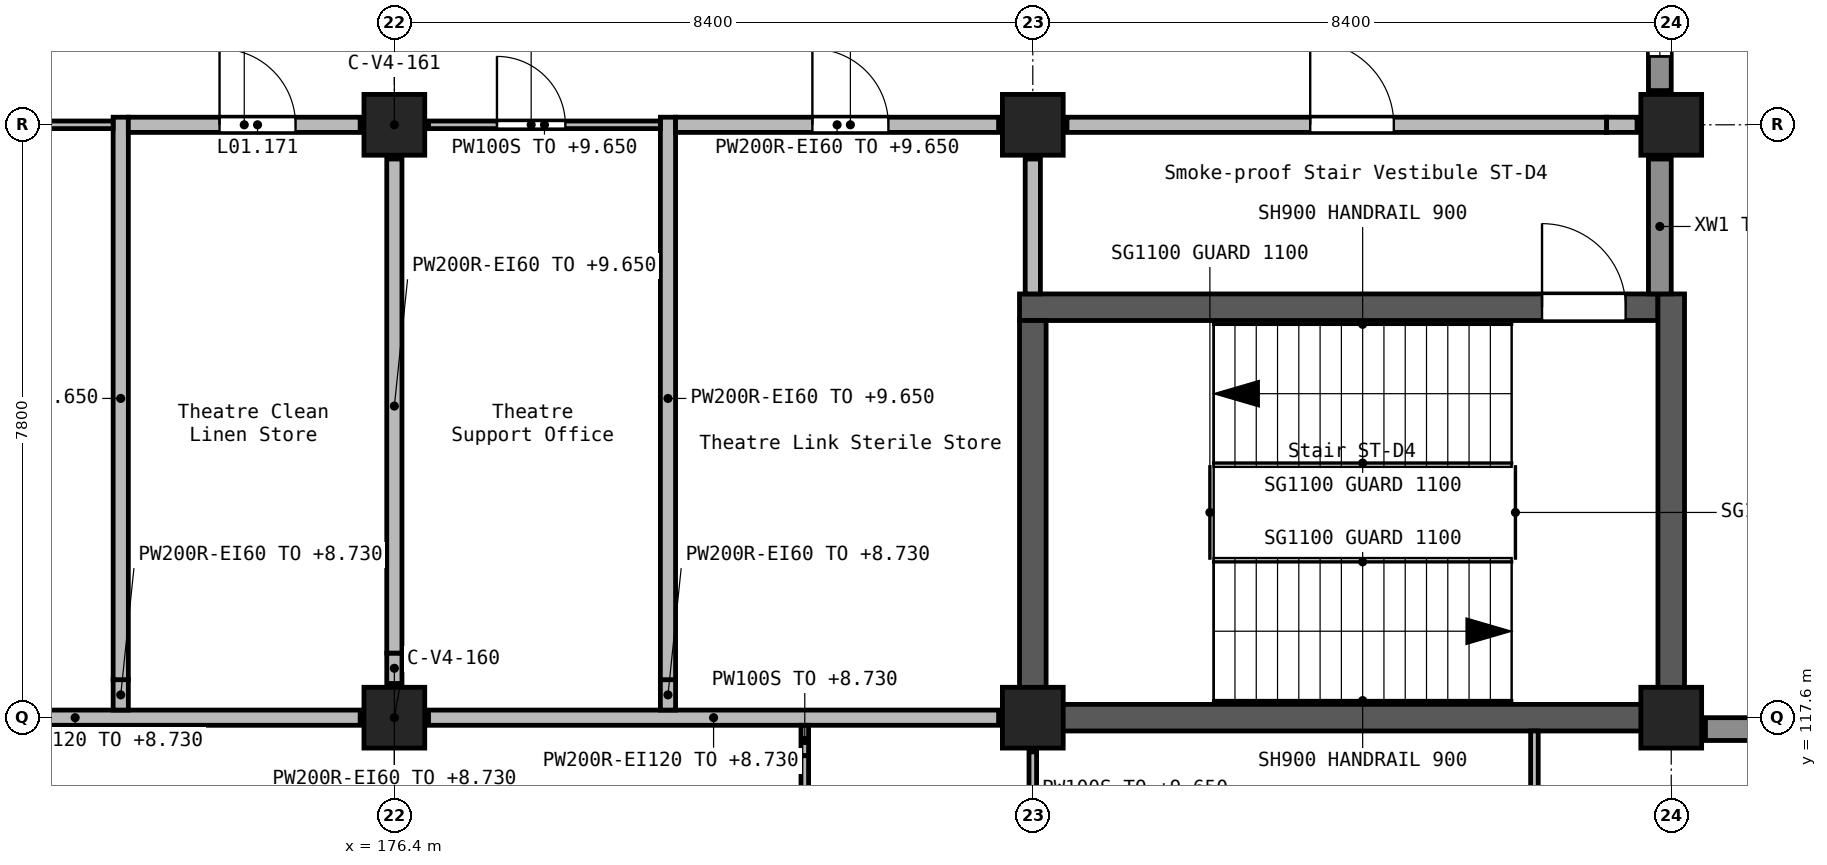
"""IFC4 building model, lengths in metres.
Left out: names, types, materials, properties, quantities, classifications, styles, units other than length and angle.
Written with IfcOpenShell. Run it as: python <this file> out.ifc"""

import sys

from ifc_helpers import new_model, si_unit, direction, frame, frame_2d, origin, origin_2d, place, context, subcontext, project, spatial, rectangle, extrude, element, fill, save


model = new_model("IFC4")
c1 = context("Model", 3, precision=1e-05, world=origin(), true_north=direction((0.0, 1.0)))
c2 = subcontext(c1, "Body", "Model", "MODEL_VIEW")
j1 = project(units=[si_unit("LENGTHUNIT", "METRE"), si_unit("PLANEANGLEUNIT", "RADIAN")], contexts=[c1])
p1 = place(None, origin())
s1 = spatial("IfcSite", under=j1, at=p1, CompositionType="ELEMENT")
p2 = place(p1, origin())
s2 = spatial("IfcBuilding", under=s1, at=p2, CompositionType="ELEMENT")
p3 = place(p2, frame((0.0, 0.0, 5.4)))
s3 = spatial("IfcBuildingStorey", under=s2, at=p3, CompositionType="ELEMENT", Elevation=5.4)
for number, where, z_axis, x_axis in (
    (1, (176.4, 117.6, 0.0), (0.0, 0.0, 1.0), (1.0, 0.0, 0.0)),
    (2, (176.4, 125.4, 0.0), (0.0, 0.0, 1.0), (1.0, 0.0, 0.0)),
    (3, (184.8, 117.6, 0.0), (0.0, 0.0, 1.0), (1.0, 0.0, 0.0)),
    (4, (184.8, 125.4, 0.0), (0.0, 0.0, 1.0), (1.0, 0.0, 0.0)),
    (5, (193.2, 117.6, 0.0), (0.0, 0.0, 1.0), (1.0, 0.0, 0.0)),
    (6, (193.2, 125.4, 0.0), (0.0, 0.0, 1.0), (1.0, 0.0, 0.0)),
):
    element("IfcColumn", number, at=place(p3, frame(where, z_axis=z_axis, x_axis=x_axis)), inside=s3, PredefinedType="COLUMN", context=c2, shape_type="SweptSolid", body=[
        extrude(rectangle(XDim=0.8, YDim=0.8, at=origin_2d()), origin(), (0.0, 0.0, 1.0), 4.5),
    ])
p4 = place(p3, frame((184.625, 123.0, 0.0), z_axis=(0.0, 0.0, 1.0), x_axis=(1.0, 0.0, 0.0)))
e7 = element("IfcWall", 7, at=p4, inside=s3, PredefinedType="SHEAR", context=c2, shape_type="SweptSolid", body=[
    extrude(rectangle(XDim=8.4, YDim=0.35, at=frame_2d((4.2, 0.0))), origin(), (0.0, 0.0, 1.0), 4.5),
])
p5 = place(p4, frame((6.875, 0.0, 0.0)))
e8 = element("IfcOpeningElement", 8, at=p5, cuts=e7, PredefinedType="OPENING", context=c2, shape_type="SweptSolid", body=[
    extrude(rectangle(XDim=1.1, YDim=2.1, at=frame_2d((0.55, 1.05))), frame((0.0, 0.185, 0.0), z_axis=(0.0, -1.0, 0.0), x_axis=(1.0, 0.0, 0.0)), (0.0, 0.0, 1.0), 0.37),
])
p6 = place(p3, frame((184.8, 117.425, 0.0), z_axis=(0.0, 0.0, 1.0), x_axis=(0.0, 1.0, 0.0)))
e9 = element("IfcWall", 9, at=p6, inside=s3, PredefinedType="SHEAR", context=c2, shape_type="SweptSolid", body=[
    extrude(rectangle(XDim=5.4, YDim=0.35, at=frame_2d((2.7, 0.0))), origin(), (0.0, 0.0, 1.0), 4.5),
])
p7 = place(p3, frame((184.975, 117.6, 0.0), z_axis=(0.0, 0.0, 1.0), x_axis=(1.0, 0.0, 0.0)))
e10 = element("IfcWall", 10, at=p7, inside=s3, PredefinedType="SHEAR", context=c2, shape_type="SweptSolid", body=[
    extrude(rectangle(XDim=8.05, YDim=0.35, at=frame_2d((4.025, 0.0))), origin(), (0.0, 0.0, 1.0), 4.5),
])
p8 = place(p3, frame((193.2, 117.425, 0.0), z_axis=(0.0, 0.0, 1.0), x_axis=(0.0, 1.0, 0.0)))
e11 = element("IfcWall", 11, at=p8, inside=s3, PredefinedType="SHEAR", context=c2, shape_type="SweptSolid", body=[
    extrude(rectangle(XDim=5.75, YDim=0.35, at=frame_2d((2.875, 0.0))), origin(), (0.0, 0.0, 1.0), 4.5),
])
p9 = place(p3, frame((197.0, 117.45, 0.0), z_axis=(0.0, 0.0, 1.0), x_axis=(-1.0, 0.0, 0.0)))
e12 = element("IfcWall", 12, at=p9, inside=s3, PredefinedType="STANDARD", context=c2, shape_type="SweptSolid", body=[
    extrude(rectangle(XDim=3.35, YDim=0.3, at=frame_2d((1.675, 0.0))), origin(), (0.0, 0.0, 1.0), 3.35),
])
p10 = place(p9, frame((1.075, 0.0, 1.2)))
e13 = element("IfcOpeningElement", 13, at=p10, cuts=e12, PredefinedType="OPENING", context=c2, shape_type="SweptSolid", body=[
    extrude(rectangle(XDim=1.2, YDim=1.2, at=frame_2d((0.6, 0.6))), frame((0.0, 0.16, 0.0), z_axis=(0.0, -1.0, 0.0), x_axis=(1.0, 0.0, 0.0)), (0.0, 0.0, 1.0), 0.32),
])
p11 = place(p3, frame((193.05, 123.175, 0.0), z_axis=(0.0, 0.0, 1.0), x_axis=(0.0, 1.0, 0.0)))
e14 = element("IfcWall", 14, at=p11, inside=s3, PredefinedType="STANDARD", context=c2, shape_type="SweptSolid", body=[
    extrude(rectangle(XDim=1.775, YDim=0.3, at=frame_2d((0.887, 0.0))), origin(), (0.0, 0.0, 1.0), 3.35),
])
p12 = place(p3, frame((193.05, 125.85, 0.0), z_axis=(0.0, 0.0, 1.0), x_axis=(0.0, 1.0, 0.0)))
e15 = element("IfcWall", 15, at=p12, inside=s3, PredefinedType="STANDARD", context=c2, shape_type="SweptSolid", body=[
    extrude(rectangle(XDim=2.7, YDim=0.3, at=frame_2d((1.35, 0.0))), origin(), (0.0, 0.0, 1.0), 3.35),
])
p13 = place(p12, frame((0.45, 0.0, 0.9)))
e16 = element("IfcOpeningElement", 16, at=p13, cuts=e15, PredefinedType="OPENING", context=c2, shape_type="SweptSolid", body=[
    extrude(rectangle(XDim=1.8, YDim=1.5, at=frame_2d((0.9, 0.75))), frame((0.0, 0.16, 0.0), z_axis=(0.0, -1.0, 0.0), x_axis=(1.0, 0.0, 0.0)), (0.0, 0.0, 1.0), 0.32),
])
for number, where, z_axis, x_axis in (
    (17, (184.35, 117.6, 0.0), (0.0, 0.0, 1.0), (-1.0, 0.0, 0.0)),
    (18, (175.95, 117.6, 0.0), (0.0, 0.0, 1.0), (-1.0, 0.0, 0.0)),
):
    element("IfcWall", number, at=place(p3, frame(where, z_axis=z_axis, x_axis=x_axis)), inside=s3, PredefinedType="SOLIDWALL", context=c2, shape_type="SweptSolid", body=[
        extrude(rectangle(XDim=7.5, YDim=0.2, at=frame_2d((3.75, 0.0))), origin(), (0.0, 0.0, 1.0), 3.33),
    ])
p14 = place(p3, frame((185.25, 125.4, 0.0), z_axis=(0.0, 0.0, 1.0), x_axis=(1.0, 0.0, 0.0)))
e19 = element("IfcWall", 19, at=p14, inside=s3, PredefinedType="SOLIDWALL", context=c2, shape_type="SweptSolid", body=[
    extrude(rectangle(XDim=7.1, YDim=0.2, at=frame_2d((3.55, 0.0))), origin(), (0.0, 0.0, 1.0), 4.25),
])
p15 = place(p14, frame((3.2, 0.0, 0.0)))
e20 = element("IfcOpeningElement", 20, at=p15, cuts=e19, PredefinedType="OPENING", context=c2, shape_type="SweptSolid", body=[
    extrude(rectangle(XDim=1.1, YDim=2.1, at=frame_2d((0.55, 1.05))), frame((0.0, 0.11, 0.0), z_axis=(0.0, -1.0, 0.0), x_axis=(1.0, 0.0, 0.0)), (0.0, 0.0, 1.0), 0.22),
])
p16 = place(p3, frame((192.35, 125.4, 0.0), z_axis=(0.0, 0.0, 1.0), x_axis=(1.0, 0.0, 0.0)))
e21 = element("IfcWall", 21, at=p16, inside=s3, PredefinedType="SOLIDWALL", context=c2, shape_type="SweptSolid", body=[
    extrude(rectangle(XDim=0.4, YDim=0.2, at=frame_2d((0.2, 0.0))), origin(), (0.0, 0.0, 1.0), 3.33),
])
p17 = place(p3, frame((172.8, 117.7, 0.0), z_axis=(0.0, 0.0, 1.0), x_axis=(0.0, 1.0, 0.0)))
e22 = element("IfcWall", 22, at=p17, inside=s3, PredefinedType="SOLIDWALL", context=c2, shape_type="SweptSolid", body=[
    extrude(rectangle(XDim=0.4, YDim=0.2, at=frame_2d((0.2, 0.0))), origin(), (0.0, 0.0, 1.0), 3.33),
])
p18 = place(p3, frame((172.8, 118.1, 0.0), z_axis=(0.0, 0.0, 1.0), x_axis=(0.0, 1.0, 0.0)))
e23 = element("IfcWall", 23, at=p18, inside=s3, PredefinedType="SOLIDWALL", context=c2, shape_type="SweptSolid", body=[
    extrude(rectangle(XDim=7.4, YDim=0.2, at=frame_2d((3.7, 0.0))), origin(), (0.0, 0.0, 1.0), 4.25),
])
p19 = place(p3, frame((176.4, 118.05, 0.0), z_axis=(0.0, 0.0, 1.0), x_axis=(0.0, 1.0, 0.0)))
e24 = element("IfcWall", 24, at=p19, inside=s3, PredefinedType="SOLIDWALL", context=c2, shape_type="SweptSolid", body=[
    extrude(rectangle(XDim=0.4, YDim=0.2, at=frame_2d((0.2, 0.0))), origin(), (0.0, 0.0, 1.0), 3.33),
])
p20 = place(p3, frame((176.4, 118.45, 0.0), z_axis=(0.0, 0.0, 1.0), x_axis=(0.0, 1.0, 0.0)))
e25 = element("IfcWall", 25, at=p20, inside=s3, PredefinedType="SOLIDWALL", context=c2, shape_type="SweptSolid", body=[
    extrude(rectangle(XDim=6.5, YDim=0.2, at=frame_2d((3.25, 0.0))), origin(), (0.0, 0.0, 1.0), 4.25),
])
p21 = place(p3, frame((180.0, 117.7, 0.0), z_axis=(0.0, 0.0, 1.0), x_axis=(0.0, 1.0, 0.0)))
e26 = element("IfcWall", 26, at=p21, inside=s3, PredefinedType="SOLIDWALL", context=c2, shape_type="SweptSolid", body=[
    extrude(rectangle(XDim=0.4, YDim=0.2, at=frame_2d((0.2, 0.0))), origin(), (0.0, 0.0, 1.0), 3.33),
])
p22 = place(p3, frame((180.0, 118.1, 0.0), z_axis=(0.0, 0.0, 1.0), x_axis=(0.0, 1.0, 0.0)))
e27 = element("IfcWall", 27, at=p22, inside=s3, PredefinedType="SOLIDWALL", context=c2, shape_type="SweptSolid", body=[
    extrude(rectangle(XDim=7.4, YDim=0.2, at=frame_2d((3.7, 0.0))), origin(), (0.0, 0.0, 1.0), 4.25),
])
p23 = place(p3, frame((180.1, 125.4, 0.0), z_axis=(0.0, 0.0, 1.0), x_axis=(1.0, 0.0, 0.0)))
e28 = element("IfcWall", 28, at=p23, inside=s3, PredefinedType="SOLIDWALL", context=c2, shape_type="SweptSolid", body=[
    extrude(rectangle(XDim=4.25, YDim=0.2, at=frame_2d((2.125, 0.0))), origin(), (0.0, 0.0, 1.0), 4.25),
])
p24 = place(p23, frame((1.8, 0.0, 0.0)))
e29 = element("IfcOpeningElement", 29, at=p24, cuts=e28, PredefinedType="OPENING", context=c2, shape_type="SweptSolid", body=[
    extrude(rectangle(XDim=1.0, YDim=2.1, at=frame_2d((0.5, 1.05))), frame((0.0, 0.11, 0.0), z_axis=(0.0, -1.0, 0.0), x_axis=(1.0, 0.0, 0.0)), (0.0, 0.0, 1.0), 0.22),
])
p25 = place(p3, frame((172.9, 125.4, 0.0), z_axis=(0.0, 0.0, 1.0), x_axis=(1.0, 0.0, 0.0)))
e30 = element("IfcWall", 30, at=p25, inside=s3, PredefinedType="SOLIDWALL", context=c2, shape_type="SweptSolid", body=[
    extrude(rectangle(XDim=3.05, YDim=0.2, at=frame_2d((1.525, 0.0))), origin(), (0.0, 0.0, 1.0), 4.25),
])
p26 = place(p25, frame((1.2, 0.0, 0.0)))
e31 = element("IfcOpeningElement", 31, at=p26, cuts=e30, PredefinedType="OPENING", context=c2, shape_type="SweptSolid", body=[
    extrude(rectangle(XDim=1.0, YDim=2.1, at=frame_2d((0.5, 1.05))), frame((0.0, 0.11, 0.0), z_axis=(0.0, -1.0, 0.0), x_axis=(1.0, 0.0, 0.0)), (0.0, 0.0, 1.0), 0.22),
])
p27 = place(p3, frame((184.8, 123.175, 0.0), z_axis=(0.0, 0.0, 1.0), x_axis=(0.0, 1.0, 0.0)))
e32 = element("IfcWall", 32, at=p27, inside=s3, PredefinedType="SOLIDWALL", context=c2, shape_type="SweptSolid", body=[
    extrude(rectangle(XDim=1.775, YDim=0.2, at=frame_2d((0.887, 0.0))), origin(), (0.0, 0.0, 1.0), 4.25),
])
p28 = place(p3, frame((181.8, 117.5, 0.0), z_axis=(0.0, 0.0, 1.0), x_axis=(0.0, -1.0, 0.0)))
e33 = element("IfcWall", 33, at=p28, inside=s3, PredefinedType="PARTITIONING", context=c2, shape_type="SweptSolid", body=[
    extrude(rectangle(XDim=0.4, YDim=0.1, at=frame_2d((0.2, 0.0))), origin(), (0.0, 0.0, 1.0), 3.33),
])
p29 = place(p3, frame((181.8, 117.1, 0.0), z_axis=(0.0, 0.0, 1.0), x_axis=(0.0, -1.0, 0.0)))
e34 = element("IfcWall", 34, at=p29, inside=s3, PredefinedType="PARTITIONING", context=c2, shape_type="SweptSolid", body=[
    extrude(rectangle(XDim=18.15, YDim=0.1, at=frame_2d((9.075, 0.0))), origin(), (0.0, 0.0, 1.0), 4.25),
])
p30 = place(p29, frame((8.401, 0.0, 0.0)))
e35 = element("IfcOpeningElement", 35, at=p30, cuts=e34, PredefinedType="OPENING", context=c2, shape_type="SweptSolid", body=[
    extrude(rectangle(XDim=1.4, YDim=2.1, at=frame_2d((0.7, 1.05))), frame((0.0, 0.06, 0.0), z_axis=(0.0, -1.0, 0.0), x_axis=(1.0, 0.0, 0.0)), (0.0, 0.0, 1.0), 0.12),
])
p31 = place(p29, frame((5.652, 0.0, 0.0)))
e36 = element("IfcOpeningElement", 36, at=p31, cuts=e34, PredefinedType="OPENING", context=c2, shape_type="SweptSolid", body=[
    extrude(rectangle(XDim=0.9, YDim=2.1, at=frame_2d((0.45, 1.05))), frame((0.0, 0.06, 0.0), z_axis=(0.0, -1.0, 0.0), x_axis=(1.0, 0.0, 0.0)), (0.0, 0.0, 1.0), 0.12),
])
p32 = place(p29, frame((1.201, 0.0, 0.0)))
e37 = element("IfcOpeningElement", 37, at=p32, cuts=e34, PredefinedType="OPENING", context=c2, shape_type="SweptSolid", body=[
    extrude(rectangle(XDim=1.4, YDim=2.1, at=frame_2d((0.7, 1.05))), frame((0.0, 0.06, 0.0), z_axis=(0.0, -1.0, 0.0), x_axis=(1.0, 0.0, 0.0)), (0.0, 0.0, 1.0), 0.12),
])
p33 = place(p3, frame((184.8, 117.15, 0.0), z_axis=(0.0, 0.0, 1.0), x_axis=(0.0, -1.0, 0.0)))
e38 = element("IfcWall", 38, at=p33, inside=s3, PredefinedType="PARTITIONING", context=c2, shape_type="SweptSolid", body=[
    extrude(rectangle(XDim=16.25, YDim=0.1, at=frame_2d((8.125, 0.0))), origin(), (0.0, 0.0, 1.0), 4.25),
])
p34 = place(p33, frame((13.55, 0.0, 0.0)))
e39 = element("IfcOpeningElement", 39, at=p34, cuts=e38, PredefinedType="OPENING", context=c2, shape_type="SweptSolid", body=[
    extrude(rectangle(XDim=1.4, YDim=2.1, at=frame_2d((0.7, 1.05))), frame((0.0, 0.06, 0.0), z_axis=(0.0, -1.0, 0.0), x_axis=(1.0, 0.0, 0.0)), (0.0, 0.0, 1.0), 0.12),
])
p35 = place(p33, frame((9.35, 0.0, 0.0)))
e40 = element("IfcOpeningElement", 40, at=p35, cuts=e38, PredefinedType="OPENING", context=c2, shape_type="SweptSolid", body=[
    extrude(rectangle(XDim=1.4, YDim=2.1, at=frame_2d((0.7, 1.05))), frame((0.0, 0.06, 0.0), z_axis=(0.0, -1.0, 0.0), x_axis=(1.0, 0.0, 0.0)), (0.0, 0.0, 1.0), 0.12),
])
p36 = place(p33, frame((5.4, 0.0, 0.0)))
e41 = element("IfcOpeningElement", 41, at=p36, cuts=e38, PredefinedType="OPENING", context=c2, shape_type="SweptSolid", body=[
    extrude(rectangle(XDim=0.9, YDim=2.1, at=frame_2d((0.45, 1.05))), frame((0.0, 0.06, 0.0), z_axis=(0.0, -1.0, 0.0), x_axis=(1.0, 0.0, 0.0)), (0.0, 0.0, 1.0), 0.12),
])
p37 = place(p33, frame((0.95, 0.0, 0.0)))
e42 = element("IfcOpeningElement", 42, at=p37, cuts=e38, PredefinedType="OPENING", context=c2, shape_type="SweptSolid", body=[
    extrude(rectangle(XDim=1.4, YDim=2.1, at=frame_2d((0.7, 1.05))), frame((0.0, 0.06, 0.0), z_axis=(0.0, -1.0, 0.0), x_axis=(1.0, 0.0, 0.0)), (0.0, 0.0, 1.0), 0.12),
])
p38 = place(p3, frame((191.4, 117.425, 0.0), z_axis=(0.0, 0.0, 1.0), x_axis=(0.0, -1.0, 0.0)))
e43 = element("IfcWall", 43, at=p38, inside=s3, PredefinedType="PARTITIONING", context=c2, shape_type="SweptSolid", body=[
    extrude(rectangle(XDim=16.525, YDim=0.1, at=frame_2d((8.263, 0.0))), origin(), (0.0, 0.0, 1.0), 4.25),
])
p39 = place(p3, frame((168.45, 125.4, 0.0), z_axis=(0.0, 0.0, 1.0), x_axis=(1.0, 0.0, 0.0)))
e44 = element("IfcWall", 44, at=p39, inside=s3, PredefinedType="PARTITIONING", context=c2, shape_type="SweptSolid", body=[
    extrude(rectangle(XDim=4.25, YDim=0.1, at=frame_2d((2.125, 0.0))), origin(), (0.0, 0.0, 1.0), 4.25),
])
p40 = place(p39, frame((0.15, 0.0, 0.0)))
e45 = element("IfcOpeningElement", 45, at=p40, cuts=e44, PredefinedType="OPENING", context=c2, shape_type="SweptSolid", body=[
    extrude(rectangle(XDim=1.4, YDim=2.1, at=frame_2d((0.7, 1.05))), frame((0.0, 0.06, 0.0), z_axis=(0.0, -1.0, 0.0), x_axis=(1.0, 0.0, 0.0)), (0.0, 0.0, 1.0), 0.12),
])
p41 = place(p3, frame((176.85, 125.4, 0.0), z_axis=(0.0, 0.0, 1.0), x_axis=(1.0, 0.0, 0.0)))
e46 = element("IfcWall", 46, at=p41, inside=s3, PredefinedType="PARTITIONING", context=c2, shape_type="SweptSolid", body=[
    extrude(rectangle(XDim=3.05, YDim=0.1, at=frame_2d((1.525, 0.0))), origin(), (0.0, 0.0, 1.0), 4.25),
])
p42 = place(p41, frame((0.9, 0.0, 0.0)))
e47 = element("IfcOpeningElement", 47, at=p42, cuts=e46, PredefinedType="OPENING", context=c2, shape_type="SweptSolid", body=[
    extrude(rectangle(XDim=0.9, YDim=2.1, at=frame_2d((0.45, 1.05))), frame((0.0, 0.06, 0.0), z_axis=(0.0, -1.0, 0.0), x_axis=(1.0, 0.0, 0.0)), (0.0, 0.0, 1.0), 0.12),
])
p43 = place(p13, origin())
e48 = element("IfcWindow", 48, at=p43, inside=s3, PartitioningType="SINGLE_PANEL", PredefinedType="WINDOW", context=c2, shape_type="SweptSolid", body=[
    extrude(rectangle(XDim=1.8, YDim=1.5, at=frame_2d((0.9, 0.75))), frame((0.0, 0.03, 0.0), z_axis=(0.0, -1.0, 0.0), x_axis=(1.0, 0.0, 0.0)), (0.0, 0.0, 1.0), 0.06),
])
fill(e16, e48)
p44 = place(p5, frame((1.1, 0.0, 0.0), z_axis=(0.0, 0.0, 1.0), x_axis=(-1.0, 0.0, 0.0)))
e49 = element("IfcDoor", 49, at=p44, inside=s3, OperationType="SINGLE_SWING_LEFT", PredefinedType="DOOR", context=c2, shape_type="SweptSolid", body=[
    extrude(rectangle(XDim=1.1, YDim=2.1, at=frame_2d((0.55, 1.05))), frame((0.0, 0.025, 0.0), z_axis=(0.0, -1.0, 0.0), x_axis=(1.0, 0.0, 0.0)), (0.0, 0.0, 1.0), 0.05),
])
fill(e8, e49)
p45 = place(p15, frame((1.1, 0.0, 0.0), z_axis=(0.0, 0.0, 1.0), x_axis=(-1.0, 0.0, 0.0)))
e50 = element("IfcDoor", 50, at=p45, inside=s3, OperationType="SINGLE_SWING_LEFT", PredefinedType="DOOR", context=c2, shape_type="SweptSolid", body=[
    extrude(rectangle(XDim=1.1, YDim=2.1, at=frame_2d((0.55, 1.05))), frame((0.0, 0.025, 0.0), z_axis=(0.0, -1.0, 0.0), x_axis=(1.0, 0.0, 0.0)), (0.0, 0.0, 1.0), 0.05),
])
fill(e20, e50)
p46 = place(p26, frame((1.0, 0.0, 0.0), z_axis=(0.0, 0.0, 1.0), x_axis=(-1.0, 0.0, 0.0)))
e51 = element("IfcDoor", 51, at=p46, inside=s3, OperationType="SINGLE_SWING_LEFT", PredefinedType="DOOR", context=c2, shape_type="SweptSolid", body=[
    extrude(rectangle(XDim=1.0, YDim=2.1, at=frame_2d((0.5, 1.05))), frame((0.0, 0.025, 0.0), z_axis=(0.0, -1.0, 0.0), x_axis=(1.0, 0.0, 0.0)), (0.0, 0.0, 1.0), 0.05),
])
fill(e31, e51)
p47 = place(p42, frame((0.9, 0.0, 0.0), z_axis=(0.0, 0.0, 1.0), x_axis=(-1.0, 0.0, 0.0)))
e52 = element("IfcDoor", 52, at=p47, inside=s3, OperationType="SINGLE_SWING_RIGHT", PredefinedType="DOOR", context=c2, shape_type="SweptSolid", body=[
    extrude(rectangle(XDim=0.9, YDim=2.1, at=frame_2d((0.45, 1.05))), frame((0.0, 0.025, 0.0), z_axis=(0.0, -1.0, 0.0), x_axis=(1.0, 0.0, 0.0)), (0.0, 0.0, 1.0), 0.05),
])
fill(e47, e52)
p48 = place(p24, frame((1.0, 0.0, 0.0), z_axis=(0.0, 0.0, 1.0), x_axis=(-1.0, 0.0, 0.0)))
e53 = element("IfcDoor", 53, at=p48, inside=s3, OperationType="SINGLE_SWING_LEFT", PredefinedType="DOOR", context=c2, shape_type="SweptSolid", body=[
    extrude(rectangle(XDim=1.0, YDim=2.1, at=frame_2d((0.5, 1.05))), frame((0.0, 0.025, 0.0), z_axis=(0.0, -1.0, 0.0), x_axis=(1.0, 0.0, 0.0)), (0.0, 0.0, 1.0), 0.05),
])
fill(e29, e53)
save(model, sys.argv[1])
